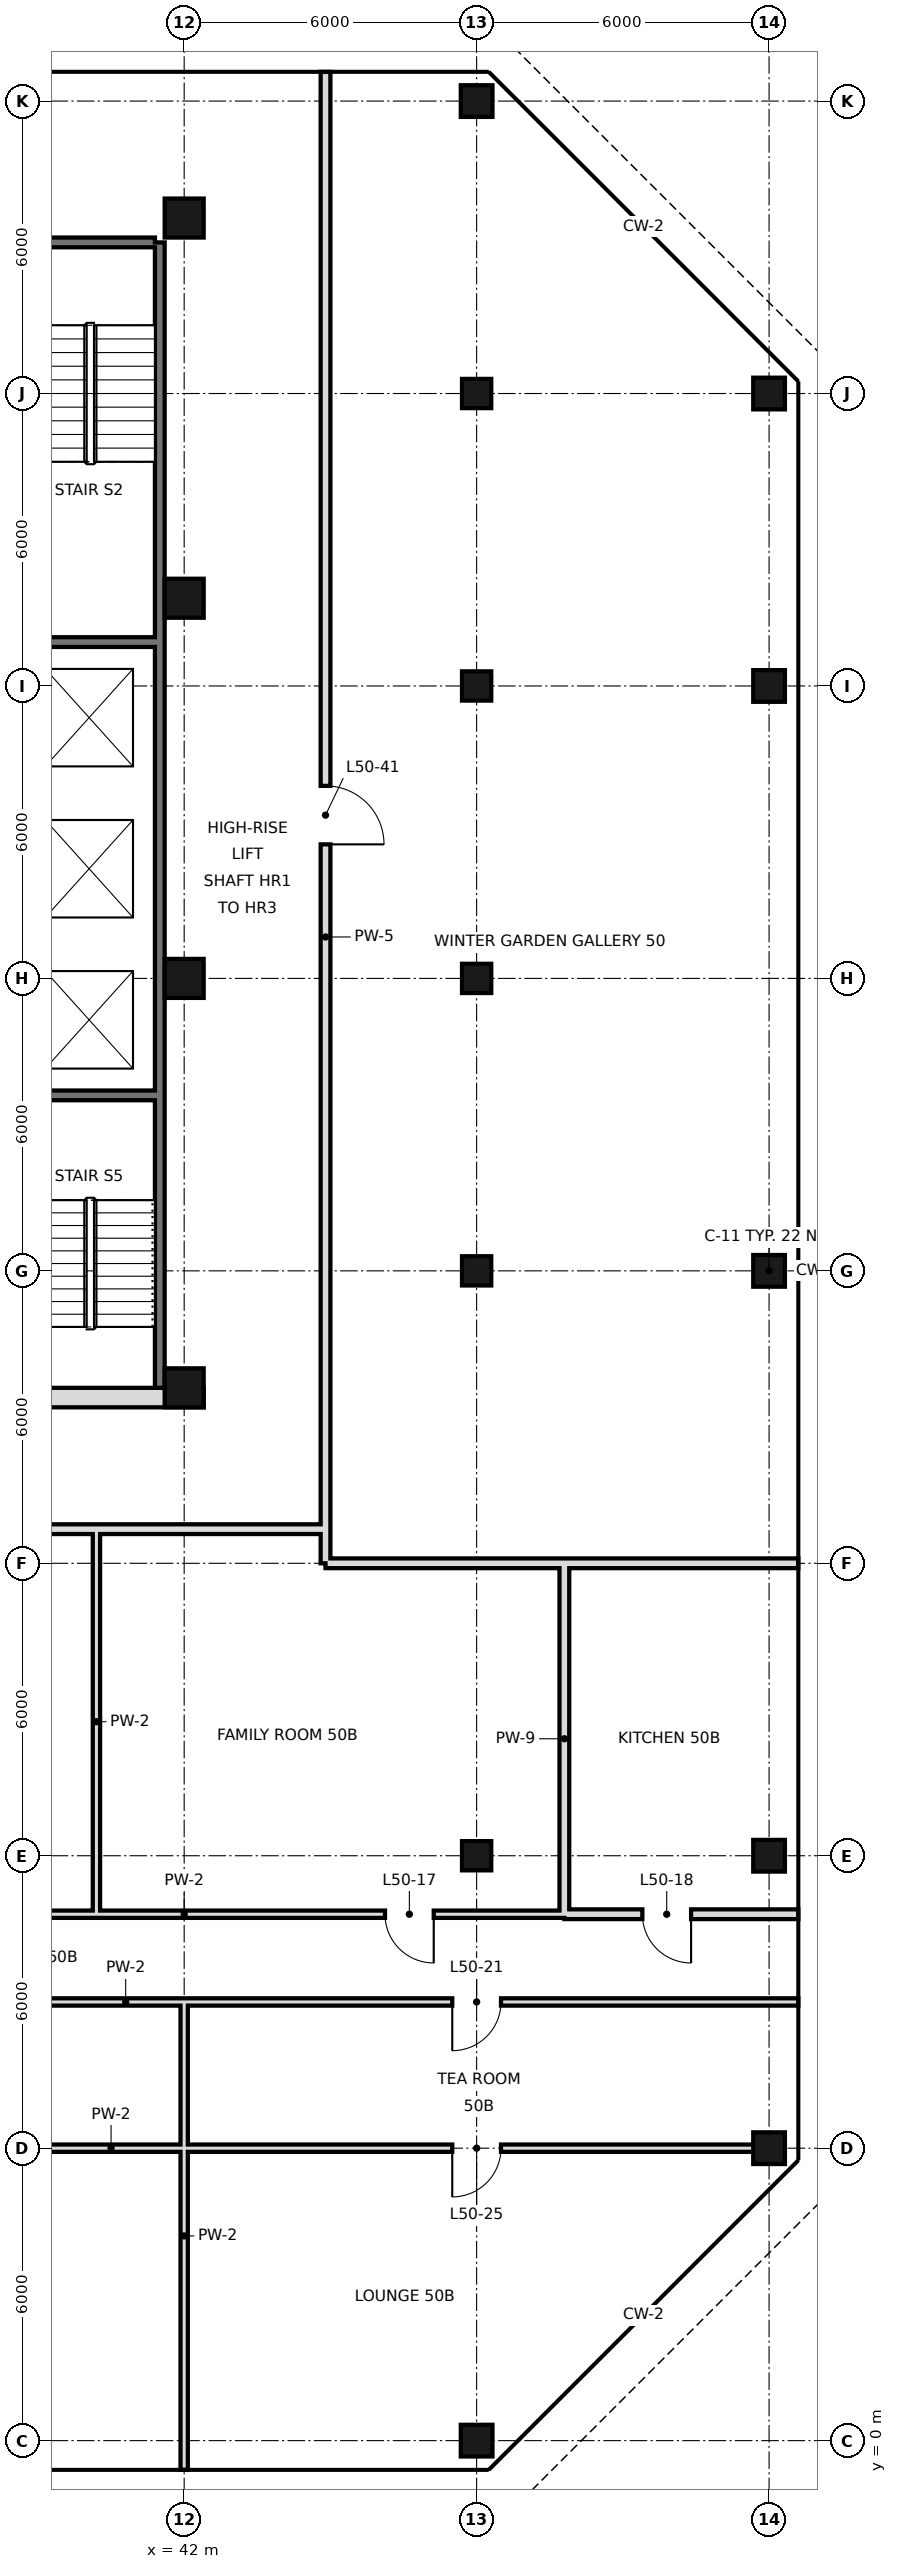
"""IFC4 building model, lengths in metres.
Left out: names, types, materials, properties, quantities, classifications, styles, units other than length and angle.
Written with IfcOpenShell. Run it as: python <this file> out.ifc"""

import sys

from ifc_helpers import new_model, si_unit, direction, frame, frame_2d, origin, origin_2d, place, context, subcontext, project, spatial, rectangle, hollow_rectangle, extrude, element, fill, save


model = new_model("IFC4")
c1 = context("Model", 3, precision=1e-05, world=origin(), true_north=direction((0.0, 1.0)))
c2 = subcontext(c1, "Body", "Model", "MODEL_VIEW")
j1 = project(units=[si_unit("LENGTHUNIT", "METRE"), si_unit("PLANEANGLEUNIT", "RADIAN")], contexts=[c1])
p1 = place(None, origin())
s1 = spatial("IfcSite", under=j1, at=p1, CompositionType="ELEMENT")
p2 = place(p1, origin())
s2 = spatial("IfcBuilding", under=s1, at=p2, CompositionType="ELEMENT")
p3 = place(p2, frame((0.0, 0.0, 215.4)))
s3 = spatial("IfcBuildingStorey", under=s2, at=p3, CompositionType="ELEMENT", Elevation=215.4)
for number, where, z_axis, x_axis in (
    (1, (42.0, 21.6, 0.0), (0.0, 0.0, 1.0), (1.0, 0.0, 0.0)),
    (2, (42.0, 30.0, 0.0), (0.0, 0.0, 1.0), (1.0, 0.0, 0.0)),
    (3, (42.0, 37.8, 0.0), (0.0, 0.0, 1.0), (1.0, 0.0, 0.0)),
    (4, (42.0, 45.6, 0.0), (0.0, 0.0, 1.0), (1.0, 0.0, 0.0)),
):
    element("IfcColumn", number, at=place(p3, frame(where, z_axis=z_axis, x_axis=x_axis)), inside=s3, PredefinedType="COLUMN", context=c2, shape_type="SweptSolid", body=[
        extrude(hollow_rectangle(XDim=0.8, YDim=0.8, WallThickness=0.04, at=origin_2d()), origin(), (0.0, 0.0, 1.0), 3.6),
    ])
p4 = place(p3, frame((48.0, 0.0, 0.0), z_axis=(0.0, 0.0, 1.0), x_axis=(1.0, 0.0, 0.0)))
e5 = element("IfcColumn", 5, at=p4, inside=s3, PredefinedType="COLUMN", context=c2, shape_type="SweptSolid", body=[
    extrude(hollow_rectangle(XDim=0.65, YDim=0.65, WallThickness=0.032, at=origin_2d()), origin(), (0.0, 0.0, 1.0), 3.6),
])
for number, where, z_axis, x_axis in (
    (6, (48.0, 12.0, 0.0), (0.0, 0.0, 1.0), (1.0, 0.0, 0.0)),
    (7, (48.0, 24.0, 0.0), (0.0, 0.0, 1.0), (1.0, 0.0, 0.0)),
    (8, (48.0, 30.0, 0.0), (0.0, 0.0, 1.0), (1.0, 0.0, 0.0)),
    (9, (48.0, 36.0, 0.0), (0.0, 0.0, 1.0), (1.0, 0.0, 0.0)),
    (10, (48.0, 42.0, 0.0), (0.0, 0.0, 1.0), (1.0, 0.0, 0.0)),
):
    element("IfcColumn", number, at=place(p3, frame(where, z_axis=z_axis, x_axis=x_axis)), inside=s3, PredefinedType="COLUMN", context=c2, shape_type="SweptSolid", body=[
        extrude(hollow_rectangle(XDim=0.6, YDim=0.6, WallThickness=0.028, at=origin_2d()), origin(), (0.0, 0.0, 1.0), 3.6),
    ])
for number, where, z_axis, x_axis in (
    (11, (48.0, 48.0, 0.0), (0.0, 0.0, 1.0), (1.0, 0.0, 0.0)),
    (12, (54.0, 6.0, 0.0), (0.0, 0.0, 1.0), (1.0, 0.0, 0.0)),
    (13, (54.0, 12.0, 0.0), (0.0, 0.0, 1.0), (1.0, 0.0, 0.0)),
    (14, (54.0, 24.0, 0.0), (0.0, 0.0, 1.0), (1.0, 0.0, 0.0)),
    (15, (54.0, 36.0, 0.0), (0.0, 0.0, 1.0), (1.0, 0.0, 0.0)),
    (16, (54.0, 42.0, 0.0), (0.0, 0.0, 1.0), (1.0, 0.0, 0.0)),
):
    element("IfcColumn", number, at=place(p3, frame(where, z_axis=z_axis, x_axis=x_axis)), inside=s3, PredefinedType="COLUMN", context=c2, shape_type="SweptSolid", body=[
        extrude(hollow_rectangle(XDim=0.65, YDim=0.65, WallThickness=0.032, at=origin_2d()), origin(), (0.0, 0.0, 1.0), 3.6),
    ])
p5 = place(p3, frame((40.2, 10.8, 0.0), z_axis=(0.0, 0.0, 1.0), x_axis=(0.0, 1.0, 0.0)))
e17 = element("IfcWall", 17, at=p5, inside=s3, PredefinedType="PARTITIONING", context=c2, shape_type="SweptSolid", body=[
    extrude(rectangle(XDim=7.9, YDim=0.15, at=frame_2d((3.95, 0.0))), origin(), (0.0, 0.0, 1.0), 3.42),
])
p6 = place(p3, frame((42.0, -0.6, 0.0), z_axis=(0.0, 0.0, 1.0), x_axis=(0.0, 1.0, 0.0)))
e18 = element("IfcWall", 18, at=p6, inside=s3, PredefinedType="PARTITIONING", context=c2, shape_type="SweptSolid", body=[
    extrude(rectangle(XDim=9.6, YDim=0.15, at=frame_2d((4.8, 0.0))), origin(), (0.0, 0.0, 1.0), 2.72),
])
p7 = place(p3, frame((44.9, 18.0, 0.0), z_axis=(0.0, 0.0, 1.0), x_axis=(0.0, 1.0, 0.0)))
e19 = element("IfcWall", 19, at=p7, inside=s3, PredefinedType="SOLIDWALL", context=c2, shape_type="SweptSolid", body=[
    extrude(rectangle(XDim=30.6, YDim=0.2, at=frame_2d((15.3, 0.0))), origin(), (0.0, 0.0, 1.0), 2.72),
])
p8 = place(p7, frame((14.75, 0.0, 0.0)))
e20 = element("IfcOpeningElement", 20, at=p8, cuts=e19, PredefinedType="OPENING", context=c2, shape_type="SweptSolid", body=[
    extrude(rectangle(XDim=1.2, YDim=2.4, at=frame_2d((0.6, 1.2))), frame((0.0, 0.11, 0.0), z_axis=(0.0, -1.0, 0.0), x_axis=(1.0, 0.0, 0.0)), (0.0, 0.0, 1.0), 0.22),
])
p9 = place(p3, frame((49.8, 10.8, 0.0), z_axis=(0.0, 0.0, 1.0), x_axis=(0.0, 1.0, 0.0)))
e21 = element("IfcWall", 21, at=p9, inside=s3, PredefinedType="SOLIDWALL", context=c2, shape_type="SweptSolid", body=[
    extrude(rectangle(XDim=7.2, YDim=0.2, at=frame_2d((3.6, 0.0))), origin(), (0.0, 0.0, 1.0), 2.97),
])
p10 = place(p3, frame((49.8, 10.8, 0.0), z_axis=(0.0, 0.0, 1.0), x_axis=(1.0, 0.0, 0.0)))
e22 = element("IfcWall", 22, at=p10, inside=s3, PredefinedType="SOLIDWALL", context=c2, shape_type="SweptSolid", body=[
    extrude(rectangle(XDim=4.8, YDim=0.2, at=frame_2d((2.4, 0.0))), origin(), (0.0, 0.0, 1.0), 2.97),
])
p11 = place(p10, frame((1.6, 0.0, 0.0)))
e23 = element("IfcOpeningElement", 23, at=p11, cuts=e22, PredefinedType="OPENING", context=c2, shape_type="SweptSolid", body=[
    extrude(rectangle(XDim=1.0, YDim=2.4, at=frame_2d((0.5, 1.2))), frame((0.0, 0.11, 0.0), z_axis=(0.0, -1.0, 0.0), x_axis=(1.0, 0.0, 0.0)), (0.0, 0.0, 1.0), 0.22),
])
p12 = place(p3, frame((34.2, 10.8, 0.0), z_axis=(0.0, 0.0, 1.0), x_axis=(1.0, 0.0, 0.0)))
e24 = element("IfcWall", 24, at=p12, inside=s3, PredefinedType="PARTITIONING", context=c2, shape_type="SweptSolid", body=[
    extrude(rectangle(XDim=15.6, YDim=0.15, at=frame_2d((7.8, 0.0))), origin(), (0.0, 0.0, 1.0), 3.42),
])
p13 = place(p12, frame((3.4, 0.0, 0.0)))
e25 = element("IfcOpeningElement", 25, at=p13, cuts=e24, PredefinedType="OPENING", context=c2, shape_type="SweptSolid", body=[
    extrude(rectangle(XDim=1.0, YDim=2.4, at=frame_2d((0.5, 1.2))), frame((0.0, 0.085, 0.0), z_axis=(0.0, -1.0, 0.0), x_axis=(1.0, 0.0, 0.0)), (0.0, 0.0, 1.0), 0.17),
])
p14 = place(p12, frame((11.92, 0.0, 0.0)))
e26 = element("IfcOpeningElement", 26, at=p14, cuts=e24, PredefinedType="OPENING", context=c2, shape_type="SweptSolid", body=[
    extrude(rectangle(XDim=1.0, YDim=2.4, at=frame_2d((0.5, 1.2))), frame((0.0, 0.085, 0.0), z_axis=(0.0, -1.0, 0.0), x_axis=(1.0, 0.0, 0.0)), (0.0, 0.0, 1.0), 0.17),
])
p15 = place(p3, frame((44.9, 18.0, 0.0), z_axis=(0.0, 0.0, 1.0), x_axis=(1.0, 0.0, 0.0)))
e27 = element("IfcWall", 27, at=p15, inside=s3, PredefinedType="SOLIDWALL", context=c2, shape_type="SweptSolid", body=[
    extrude(rectangle(XDim=4.9, YDim=0.2, at=frame_2d((2.45, 0.0))), origin(), (0.0, 0.0, 1.0), 2.72),
])
p16 = place(p3, frame((49.8, 18.0, 0.0), z_axis=(0.0, 0.0, 1.0), x_axis=(1.0, 0.0, 0.0)))
e28 = element("IfcWall", 28, at=p16, inside=s3, PredefinedType="SOLIDWALL", context=c2, shape_type="SweptSolid", body=[
    extrude(rectangle(XDim=4.8, YDim=0.2, at=frame_2d((2.4, 0.0))), origin(), (0.0, 0.0, 1.0), 2.72),
])
p17 = place(p3, frame((7.2, 18.7, 0.0), z_axis=(0.0, 0.0, 1.0), x_axis=(1.0, 0.0, 0.0)))
e29 = element("IfcWall", 29, at=p17, inside=s3, PredefinedType="SOLIDWALL", context=c2, shape_type="SweptSolid", body=[
    extrude(rectangle(XDim=37.7, YDim=0.2, at=frame_2d((18.85, 0.0))), origin(), (0.0, 0.0, 1.0), 2.72),
])
p18 = place(p17, frame((1.54, 0.0, 0.0)))
e30 = element("IfcOpeningElement", 30, at=p18, cuts=e29, PredefinedType="OPENING", context=c2, shape_type="SweptSolid", body=[
    extrude(rectangle(XDim=1.2, YDim=2.4, at=frame_2d((0.6, 1.2))), frame((0.0, 0.11, 0.0), z_axis=(0.0, -1.0, 0.0), x_axis=(1.0, 0.0, 0.0)), (0.0, 0.0, 1.0), 0.22),
])
p19 = place(p17, frame((30.26, 0.0, 0.0)))
e31 = element("IfcOpeningElement", 31, at=p19, cuts=e29, PredefinedType="OPENING", context=c2, shape_type="SweptSolid", body=[
    extrude(rectangle(XDim=1.2, YDim=2.4, at=frame_2d((0.6, 1.2))), frame((0.0, 0.11, 0.0), z_axis=(0.0, -1.0, 0.0), x_axis=(1.0, 0.0, 0.0)), (0.0, 0.0, 1.0), 0.22),
])
p20 = place(p3, frame((27.0, 6.0, 0.0), z_axis=(0.0, 0.0, 1.0), x_axis=(1.0, 0.0, 0.0)))
e32 = element("IfcWall", 32, at=p20, inside=s3, PredefinedType="PARTITIONING", context=c2, shape_type="SweptSolid", body=[
    extrude(rectangle(XDim=27.0, YDim=0.15, at=frame_2d((13.5, 0.0))), origin(), (0.0, 0.0, 1.0), 2.97),
])
p21 = place(p20, frame((0.7, 0.0, 0.0)))
e33 = element("IfcOpeningElement", 33, at=p21, cuts=e32, PredefinedType="OPENING", context=c2, shape_type="SweptSolid", body=[
    extrude(rectangle(XDim=1.0, YDim=2.4, at=frame_2d((0.5, 1.2))), frame((0.0, 0.085, 0.0), z_axis=(0.0, -1.0, 0.0), x_axis=(1.0, 0.0, 0.0)), (0.0, 0.0, 1.0), 0.17),
])
p22 = place(p20, frame((8.1, 0.0, 0.0)))
e34 = element("IfcOpeningElement", 34, at=p22, cuts=e32, PredefinedType="OPENING", context=c2, shape_type="SweptSolid", body=[
    extrude(rectangle(XDim=1.8, YDim=2.4, at=frame_2d((0.9, 1.2))), frame((0.0, 0.085, 0.0), z_axis=(0.0, -1.0, 0.0), x_axis=(1.0, 0.0, 0.0)), (0.0, 0.0, 1.0), 0.17),
])
p23 = place(p20, frame((20.5, 0.0, 0.0)))
e35 = element("IfcOpeningElement", 35, at=p23, cuts=e32, PredefinedType="OPENING", context=c2, shape_type="SweptSolid", body=[
    extrude(rectangle(XDim=1.0, YDim=2.4, at=frame_2d((0.5, 1.2))), frame((0.0, 0.085, 0.0), z_axis=(0.0, -1.0, 0.0), x_axis=(1.0, 0.0, 0.0)), (0.0, 0.0, 1.0), 0.17),
])
p24 = place(p3, frame((27.0, 9.0, 0.0), z_axis=(0.0, 0.0, 1.0), x_axis=(1.0, 0.0, 0.0)))
e36 = element("IfcWall", 36, at=p24, inside=s3, PredefinedType="PARTITIONING", context=c2, shape_type="SweptSolid", body=[
    extrude(rectangle(XDim=27.6, YDim=0.15, at=frame_2d((13.8, 0.0))), origin(), (0.0, 0.0, 1.0), 3.42),
])
p25 = place(p24, frame((1.0, 0.0, 0.0)))
e37 = element("IfcOpeningElement", 37, at=p25, cuts=e36, PredefinedType="OPENING", context=c2, shape_type="SweptSolid", body=[
    extrude(rectangle(XDim=1.0, YDim=2.4, at=frame_2d((0.5, 1.2))), frame((0.0, 0.085, 0.0), z_axis=(0.0, -1.0, 0.0), x_axis=(1.0, 0.0, 0.0)), (0.0, 0.0, 1.0), 0.17),
])
p26 = place(p24, frame((8.1, 0.0, 0.0)))
e38 = element("IfcOpeningElement", 38, at=p26, cuts=e36, PredefinedType="OPENING", context=c2, shape_type="SweptSolid", body=[
    extrude(rectangle(XDim=1.8, YDim=2.4, at=frame_2d((0.9, 1.2))), frame((0.0, 0.085, 0.0), z_axis=(0.0, -1.0, 0.0), x_axis=(1.0, 0.0, 0.0)), (0.0, 0.0, 1.0), 0.17),
])
p27 = place(p24, frame((20.5, 0.0, 0.0)))
e39 = element("IfcOpeningElement", 39, at=p27, cuts=e36, PredefinedType="OPENING", context=c2, shape_type="SweptSolid", body=[
    extrude(rectangle(XDim=1.0, YDim=2.4, at=frame_2d((0.5, 1.2))), frame((0.0, 0.085, 0.0), z_axis=(0.0, -1.0, 0.0), x_axis=(1.0, 0.0, 0.0)), (0.0, 0.0, 1.0), 0.17),
])
p28 = place(p3, frame((41.5, 21.6, 0.0), z_axis=(0.0, 0.0, 1.0), x_axis=(0.0, 1.0, 0.0)))
e40 = element("IfcWall", 40, at=p28, inside=s3, PredefinedType="SOLIDWALL", context=c2, shape_type="SweptSolid", body=[
    extrude(rectangle(XDim=23.5, YDim=0.2, at=frame_2d((11.75, 0.0))), origin(), (0.0, 0.0, 1.0), 3.42),
])
p29 = place(p3, frame((6.6, 45.1, 0.0), z_axis=(0.0, 0.0, 1.0), x_axis=(1.0, 0.0, 0.0)))
e41 = element("IfcWall", 41, at=p29, inside=s3, PredefinedType="SOLIDWALL", context=c2, shape_type="SweptSolid", body=[
    extrude(rectangle(XDim=34.8, YDim=0.2, at=frame_2d((17.4, 0.0))), origin(), (0.0, 0.0, 1.0), 3.42),
])
p30 = place(p3, frame((5.6, 21.4, 0.0), z_axis=(0.0, 0.0, 1.0), x_axis=(1.0, 0.0, 0.0)))
e42 = element("IfcWall", 42, at=p30, inside=s3, PredefinedType="SOLIDWALL", context=c2, shape_type="SweptSolid", body=[
    extrude(rectangle(XDim=36.8, YDim=0.4, at=frame_2d((18.4, 0.0))), origin(), (0.0, 0.0, 1.0), 3.42),
])
p31 = place(p30, frame((8.5, 0.0, 0.0)))
e43 = element("IfcOpeningElement", 43, at=p31, cuts=e42, PredefinedType="OPENING", context=c2, shape_type="SweptSolid", body=[
    extrude(rectangle(XDim=1.8, YDim=2.1, at=frame_2d((0.9, 1.05))), frame((0.0, 0.21, 0.0), z_axis=(0.0, -1.0, 0.0), x_axis=(1.0, 0.0, 0.0)), (0.0, 0.0, 1.0), 0.42),
])
p32 = place(p30, frame((17.5, 0.0, 0.0)))
e44 = element("IfcOpeningElement", 44, at=p32, cuts=e42, PredefinedType="OPENING", context=c2, shape_type="SweptSolid", body=[
    extrude(rectangle(XDim=1.8, YDim=2.1, at=frame_2d((0.9, 1.05))), frame((0.0, 0.21, 0.0), z_axis=(0.0, -1.0, 0.0), x_axis=(1.0, 0.0, 0.0)), (0.0, 0.0, 1.0), 0.42),
])
p33 = place(p30, frame((26.5, 0.0, 0.0)))
e45 = element("IfcOpeningElement", 45, at=p33, cuts=e42, PredefinedType="OPENING", context=c2, shape_type="SweptSolid", body=[
    extrude(rectangle(XDim=1.8, YDim=2.1, at=frame_2d((0.9, 1.05))), frame((0.0, 0.21, 0.0), z_axis=(0.0, -1.0, 0.0), x_axis=(1.0, 0.0, 0.0)), (0.0, 0.0, 1.0), 0.42),
])
p34 = place(p30, frame((4.5, 0.0, 0.0)))
e46 = element("IfcOpeningElement", 46, at=p34, cuts=e42, PredefinedType="OPENING", context=c2, shape_type="SweptSolid", body=[
    extrude(rectangle(XDim=1.2, YDim=2.1, at=frame_2d((0.6, 1.05))), frame((0.0, 0.21, 0.0), z_axis=(0.0, -1.0, 0.0), x_axis=(1.0, 0.0, 0.0)), (0.0, 0.0, 1.0), 0.42),
])
p35 = place(p30, frame((31.1, 0.0, 0.0)))
e47 = element("IfcOpeningElement", 47, at=p35, cuts=e42, PredefinedType="OPENING", context=c2, shape_type="SweptSolid", body=[
    extrude(rectangle(XDim=1.2, YDim=2.1, at=frame_2d((0.6, 1.05))), frame((0.0, 0.21, 0.0), z_axis=(0.0, -1.0, 0.0), x_axis=(1.0, 0.0, 0.0)), (0.0, 0.0, 1.0), 0.42),
])
p36 = place(p3, frame((36.1, 27.6, 0.0), z_axis=(0.0, 0.0, 1.0), x_axis=(1.0, 0.0, 0.0)))
e48 = element("IfcWall", 48, at=p36, inside=s3, PredefinedType="SOLIDWALL", context=c2, shape_type="SweptSolid", body=[
    extrude(rectangle(XDim=5.3, YDim=0.2, at=frame_2d((2.65, 0.0))), origin(), (0.0, 0.0, 1.0), 3.42),
])
p37 = place(p3, frame((38.7, 36.9, 0.0), z_axis=(0.0, 0.0, 1.0), x_axis=(1.0, 0.0, 0.0)))
e49 = element("IfcWall", 49, at=p37, inside=s3, PredefinedType="SOLIDWALL", context=c2, shape_type="SweptSolid", body=[
    extrude(rectangle(XDim=2.7, YDim=0.2, at=frame_2d((1.35, 0.0))), origin(), (0.0, 0.0, 1.0), 3.42),
])
p38 = place(p14, origin())
e50 = element("IfcDoor", 50, at=p38, inside=s3, OperationType="SINGLE_SWING_RIGHT", PredefinedType="DOOR", context=c2, shape_type="SweptSolid", body=[
    extrude(rectangle(XDim=1.0, YDim=2.4, at=frame_2d((0.5, 1.2))), frame((0.0, 0.025, 0.0), z_axis=(0.0, -1.0, 0.0), x_axis=(1.0, 0.0, 0.0)), (0.0, 0.0, 1.0), 0.05),
])
fill(e26, e50)
p39 = place(p11, origin())
e51 = element("IfcDoor", 51, at=p39, inside=s3, OperationType="SINGLE_SWING_RIGHT", PredefinedType="DOOR", context=c2, shape_type="SweptSolid", body=[
    extrude(rectangle(XDim=1.0, YDim=2.4, at=frame_2d((0.5, 1.2))), frame((0.0, 0.025, 0.0), z_axis=(0.0, -1.0, 0.0), x_axis=(1.0, 0.0, 0.0)), (0.0, 0.0, 1.0), 0.05),
])
fill(e23, e51)
p40 = place(p27, frame((1.0, 0.0, 0.0), z_axis=(0.0, 0.0, 1.0), x_axis=(-1.0, 0.0, 0.0)))
e52 = element("IfcDoor", 52, at=p40, inside=s3, OperationType="SINGLE_SWING_RIGHT", PredefinedType="DOOR", context=c2, shape_type="SweptSolid", body=[
    extrude(rectangle(XDim=1.0, YDim=2.4, at=frame_2d((0.5, 1.2))), frame((0.0, 0.025, 0.0), z_axis=(0.0, -1.0, 0.0), x_axis=(1.0, 0.0, 0.0)), (0.0, 0.0, 1.0), 0.05),
])
fill(e39, e52)
p41 = place(p23, frame((1.0, 0.0, 0.0), z_axis=(0.0, 0.0, 1.0), x_axis=(-1.0, 0.0, 0.0)))
e53 = element("IfcDoor", 53, at=p41, inside=s3, OperationType="SINGLE_SWING_RIGHT", PredefinedType="DOOR", context=c2, shape_type="SweptSolid", body=[
    extrude(rectangle(XDim=1.0, YDim=2.4, at=frame_2d((0.5, 1.2))), frame((0.0, 0.025, 0.0), z_axis=(0.0, -1.0, 0.0), x_axis=(1.0, 0.0, 0.0)), (0.0, 0.0, 1.0), 0.05),
])
fill(e35, e53)
p42 = place(p8, frame((1.2, 0.0, 0.0), z_axis=(0.0, 0.0, 1.0), x_axis=(-1.0, 0.0, 0.0)))
e54 = element("IfcDoor", 54, at=p42, inside=s3, OperationType="SINGLE_SWING_RIGHT", PredefinedType="DOOR", context=c2, shape_type="SweptSolid", body=[
    extrude(rectangle(XDim=1.2, YDim=2.4, at=frame_2d((0.6, 1.2))), frame((0.0, 0.025, 0.0), z_axis=(0.0, -1.0, 0.0), x_axis=(1.0, 0.0, 0.0)), (0.0, 0.0, 1.0), 0.05),
])
fill(e20, e54)
save(model, sys.argv[1])
